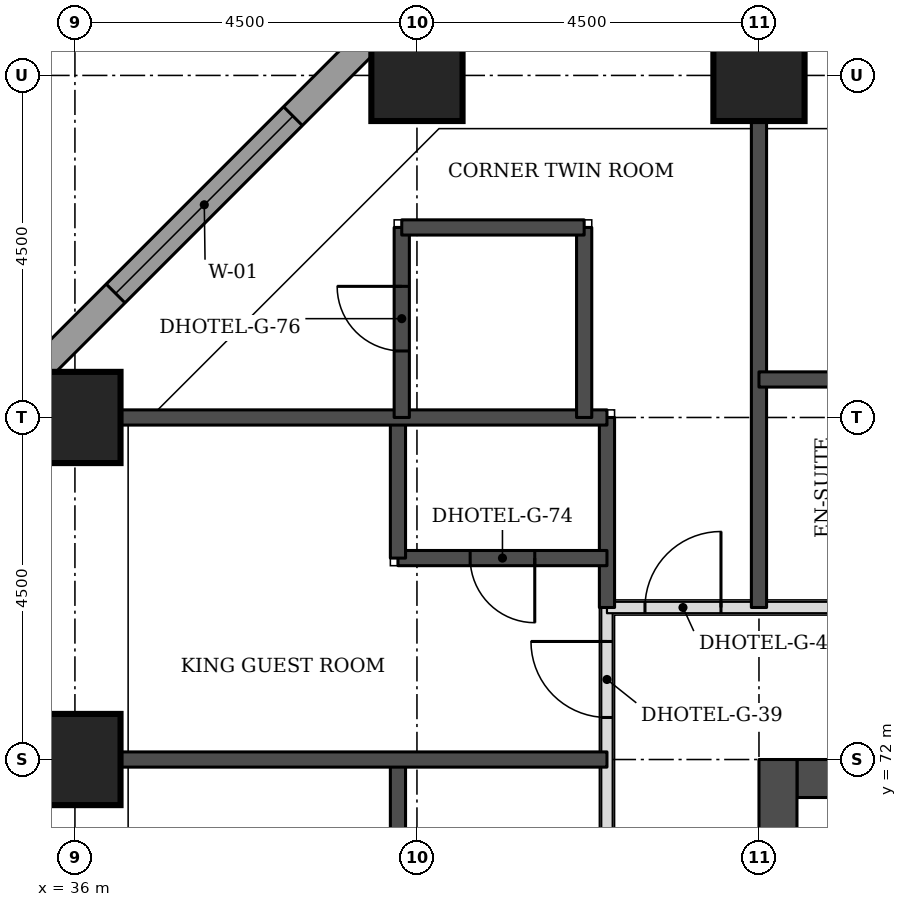
"""IFC4 building model, lengths in metres.
Left out: names, types, materials, properties, quantities, classifications, styles, units other than length and angle.
Written with IfcOpenShell. Run it as: python <this file> out.ifc"""

import sys

from ifc_helpers import new_model, si_unit, direction, frame, frame_2d, origin, origin_2d, place, context, subcontext, project, spatial, rectangle, extrude, element, fill, save


model = new_model("IFC4")
c1 = context("Model", 3, precision=1e-05, world=origin(), true_north=direction((0.0, 1.0)))
c2 = subcontext(c1, "Body", "Model", "MODEL_VIEW")
j1 = project(units=[si_unit("LENGTHUNIT", "METRE"), si_unit("PLANEANGLEUNIT", "RADIAN")], contexts=[c1])
p1 = place(None, origin())
s1 = spatial("IfcSite", under=j1, at=p1, CompositionType="ELEMENT")
p2 = place(p1, origin())
s2 = spatial("IfcBuilding", under=s1, at=p2, CompositionType="ELEMENT")
p3 = place(p2, frame((0.0, 0.0, 66.0)))
s3 = spatial("IfcBuildingStorey", under=s2, at=p3, CompositionType="ELEMENT", Elevation=66.0)
for number, where, z_axis, x_axis in (
    (1, (36.0, 72.0, 0.0), (0.0, 0.0, 1.0), (1.0, 0.0, 0.0)),
    (2, (36.0, 76.5, 0.0), (0.0, 0.0, 1.0), (1.0, 0.0, 0.0)),
    (3, (40.5, 81.0, 0.0), (0.0, 0.0, 1.0), (1.0, 0.0, 0.0)),
    (4, (45.0, 81.0, 0.0), (0.0, 0.0, 1.0), (1.0, 0.0, 0.0)),
):
    element("IfcColumn", number, at=place(p3, frame(where, z_axis=z_axis, x_axis=x_axis)), inside=s3, PredefinedType="COLUMN", context=c2, shape_type="SweptSolid", body=[
        extrude(rectangle(XDim=1.2, YDim=1.2, at=origin_2d()), origin(), (0.0, 0.0, 1.0), 3.3),
    ])
p4 = place(p3, frame((45.5, 71.75, 0.0), z_axis=(0.0, 0.0, 1.0), x_axis=(1.0, 0.0, 0.0)))
e5 = element("IfcWall", 5, at=p4, inside=s3, PredefinedType="SHEAR", context=c2, shape_type="SweptSolid", body=[
    extrude(rectangle(XDim=21.5, YDim=0.5, at=frame_2d((10.75, 0.0))), origin(), (0.0, 0.0, 1.0), 3.3),
])
p5 = place(p3, frame((45.25, 49.5, 0.0), z_axis=(0.0, 0.0, 1.0), x_axis=(0.0, 1.0, 0.0)))
e6 = element("IfcWall", 6, at=p5, inside=s3, PredefinedType="SHEAR", context=c2, shape_type="SweptSolid", body=[
    extrude(rectangle(XDim=22.5, YDim=0.5, at=frame_2d((11.25, 0.0))), origin(), (0.0, 0.0, 1.0), 3.3),
])
p6 = place(p5, frame((4.2, 0.0, 0.0)))
e7 = element("IfcOpeningElement", 7, at=p6, cuts=e6, PredefinedType="OPENING", context=c2, shape_type="SweptSolid", body=[
    extrude(rectangle(XDim=1.8, YDim=2.1, at=frame_2d((0.9, 1.05))), frame((0.0, 0.26, 0.0), z_axis=(0.0, -1.0, 0.0), x_axis=(1.0, 0.0, 0.0)), (0.0, 0.0, 1.0), 0.52),
])
p7 = place(p5, frame((6.9, 0.0, 0.0)))
e8 = element("IfcOpeningElement", 8, at=p7, cuts=e6, PredefinedType="OPENING", context=c2, shape_type="SweptSolid", body=[
    extrude(rectangle(XDim=1.1, YDim=2.1, at=frame_2d((0.55, 1.05))), frame((0.0, 0.26, 0.0), z_axis=(0.0, -1.0, 0.0), x_axis=(1.0, 0.0, 0.0)), (0.0, 0.0, 1.0), 0.52),
])
p8 = place(p5, frame((13.6, 0.0, 0.0)))
e9 = element("IfcOpeningElement", 9, at=p8, cuts=e6, PredefinedType="OPENING", context=c2, shape_type="SweptSolid", body=[
    extrude(rectangle(XDim=1.1, YDim=2.1, at=frame_2d((0.55, 1.05))), frame((0.0, 0.26, 0.0), z_axis=(0.0, -1.0, 0.0), x_axis=(1.0, 0.0, 0.0)), (0.0, 0.0, 1.0), 0.52),
])
p9 = place(p5, frame((16.5, 0.0, 0.0)))
e10 = element("IfcOpeningElement", 10, at=p9, cuts=e6, PredefinedType="OPENING", context=c2, shape_type="SweptSolid", body=[
    extrude(rectangle(XDim=1.8, YDim=2.1, at=frame_2d((0.9, 1.05))), frame((0.0, 0.26, 0.0), z_axis=(0.0, -1.0, 0.0), x_axis=(1.0, 0.0, 0.0)), (0.0, 0.0, 1.0), 0.52),
])
p10 = place(p3, frame((40.23, 81.826, 0.0), z_axis=(0.0, 0.0, 1.0), x_axis=(-0.707106781187, -0.707106781187, 0.0)))
e11 = element("IfcWall", 11, at=p10, inside=s3, PredefinedType="STANDARD", context=c2, shape_type="SweptSolid", body=[
    extrude(rectangle(XDim=7.151, YDim=0.35, at=frame_2d((3.576, 0.0))), origin(), (0.0, 0.0, 1.0), 3.055),
])
p11 = place(p10, frame((1.926, 0.0, 0.8)))
e12 = element("IfcOpeningElement", 12, at=p11, cuts=e11, PredefinedType="OPENING", context=c2, shape_type="SweptSolid", body=[
    extrude(rectangle(XDim=3.3, YDim=1.5, at=frame_2d((1.65, 0.75))), frame((0.0, 0.185, 0.0), z_axis=(0.0, -1.0, 0.0), x_axis=(1.0, 0.0, 0.0)), (0.0, 0.0, 1.0), 0.37),
])
p12 = place(p3, frame((43.0, 56.6, 0.0), z_axis=(0.0, 0.0, 1.0), x_axis=(0.0, 1.0, 0.0)))
e13 = element("IfcWall", 13, at=p12, inside=s3, PredefinedType="PARTITIONING", context=c2, shape_type="SweptSolid", body=[
    extrude(rectangle(XDim=17.4, YDim=0.15, at=frame_2d((8.7, 0.0))), origin(), (0.0, 0.0, 1.0), 3.08),
])
p13 = place(p12, frame((9.075, 0.0, 0.0)))
e14 = element("IfcOpeningElement", 14, at=p13, cuts=e13, PredefinedType="OPENING", context=c2, shape_type="SweptSolid", body=[
    extrude(rectangle(XDim=1.0, YDim=2.1, at=frame_2d((0.5, 1.05))), frame((0.0, 0.085, 0.0), z_axis=(0.0, -1.0, 0.0), x_axis=(1.0, 0.0, 0.0)), (0.0, 0.0, 1.0), 0.17),
])
p14 = place(p12, frame((11.475, 0.0, 0.0)))
e15 = element("IfcOpeningElement", 15, at=p14, cuts=e13, PredefinedType="OPENING", context=c2, shape_type="SweptSolid", body=[
    extrude(rectangle(XDim=1.0, YDim=2.1, at=frame_2d((0.5, 1.05))), frame((0.0, 0.085, 0.0), z_axis=(0.0, -1.0, 0.0), x_axis=(1.0, 0.0, 0.0)), (0.0, 0.0, 1.0), 0.17),
])
p15 = place(p12, frame((15.953, 0.0, 0.0)))
e16 = element("IfcOpeningElement", 16, at=p15, cuts=e13, PredefinedType="OPENING", context=c2, shape_type="SweptSolid", body=[
    extrude(rectangle(XDim=1.0, YDim=2.1, at=frame_2d((0.5, 1.05))), frame((0.0, 0.085, 0.0), z_axis=(0.0, -1.0, 0.0), x_axis=(1.0, 0.0, 0.0)), (0.0, 0.0, 1.0), 0.17),
])
p16 = place(p3, frame((43.0, 74.0, 0.0), z_axis=(0.0, 0.0, 1.0), x_axis=(1.0, 0.0, 0.0)))
e17 = element("IfcWall", 17, at=p16, inside=s3, PredefinedType="PARTITIONING", context=c2, shape_type="SweptSolid", body=[
    extrude(rectangle(XDim=26.5, YDim=0.15, at=frame_2d((13.25, 0.0))), origin(), (0.0, 0.0, 1.0), 3.08),
])
p17 = place(p16, frame((4.925, 0.0, 0.0)))
e18 = element("IfcOpeningElement", 18, at=p17, cuts=e17, PredefinedType="OPENING", context=c2, shape_type="SweptSolid", body=[
    extrude(rectangle(XDim=1.0, YDim=2.1, at=frame_2d((0.5, 1.05))), frame((0.0, 0.085, 0.0), z_axis=(0.0, -1.0, 0.0), x_axis=(1.0, 0.0, 0.0)), (0.0, 0.0, 1.0), 0.17),
])
p18 = place(p16, frame((7.325, 0.0, 0.0)))
e19 = element("IfcOpeningElement", 19, at=p18, cuts=e17, PredefinedType="OPENING", context=c2, shape_type="SweptSolid", body=[
    extrude(rectangle(XDim=1.0, YDim=2.1, at=frame_2d((0.5, 1.05))), frame((0.0, 0.085, 0.0), z_axis=(0.0, -1.0, 0.0), x_axis=(1.0, 0.0, 0.0)), (0.0, 0.0, 1.0), 0.17),
])
p19 = place(p16, frame((13.925, 0.0, 0.0)))
e20 = element("IfcOpeningElement", 20, at=p19, cuts=e17, PredefinedType="OPENING", context=c2, shape_type="SweptSolid", body=[
    extrude(rectangle(XDim=1.0, YDim=2.1, at=frame_2d((0.5, 1.05))), frame((0.0, 0.085, 0.0), z_axis=(0.0, -1.0, 0.0), x_axis=(1.0, 0.0, 0.0)), (0.0, 0.0, 1.0), 0.17),
])
p20 = place(p16, frame((16.325, 0.0, 0.0)))
e21 = element("IfcOpeningElement", 21, at=p20, cuts=e17, PredefinedType="OPENING", context=c2, shape_type="SweptSolid", body=[
    extrude(rectangle(XDim=1.0, YDim=2.1, at=frame_2d((0.5, 1.05))), frame((0.0, 0.085, 0.0), z_axis=(0.0, -1.0, 0.0), x_axis=(1.0, 0.0, 0.0)), (0.0, 0.0, 1.0), 0.17),
])
p21 = place(p16, frame((22.925, 0.0, 0.0)))
e22 = element("IfcOpeningElement", 22, at=p21, cuts=e17, PredefinedType="OPENING", context=c2, shape_type="SweptSolid", body=[
    extrude(rectangle(XDim=1.0, YDim=2.1, at=frame_2d((0.5, 1.05))), frame((0.0, 0.085, 0.0), z_axis=(0.0, -1.0, 0.0), x_axis=(1.0, 0.0, 0.0)), (0.0, 0.0, 1.0), 0.17),
])
p22 = place(p16, frame((0.5, 0.0, 0.0)))
e23 = element("IfcOpeningElement", 23, at=p22, cuts=e17, PredefinedType="OPENING", context=c2, shape_type="SweptSolid", body=[
    extrude(rectangle(XDim=1.0, YDim=2.1, at=frame_2d((0.5, 1.05))), frame((0.0, 0.085, 0.0), z_axis=(0.0, -1.0, 0.0), x_axis=(1.0, 0.0, 0.0)), (0.0, 0.0, 1.0), 0.17),
])
p23 = place(p16, frame((25.0, 0.0, 0.0)))
e24 = element("IfcOpeningElement", 24, at=p23, cuts=e17, PredefinedType="OPENING", context=c2, shape_type="SweptSolid", body=[
    extrude(rectangle(XDim=1.0, YDim=2.1, at=frame_2d((0.5, 1.05))), frame((0.0, 0.085, 0.0), z_axis=(0.0, -1.0, 0.0), x_axis=(1.0, 0.0, 0.0)), (0.0, 0.0, 1.0), 0.17),
])
p24 = place(p3, frame((40.25, 69.65, 0.0), z_axis=(0.0, 0.0, 1.0), x_axis=(0.0, 1.0, 0.0)))
e25 = element("IfcWall", 25, at=p24, inside=s3, PredefinedType="SOLIDWALL", context=c2, shape_type="SweptSolid", body=[
    extrude(rectangle(XDim=2.35, YDim=0.2, at=frame_2d((1.175, 0.0))), origin(), (0.0, 0.0, 1.0), 3.08),
])
p25 = place(p3, frame((36.6, 72.0, 0.0), z_axis=(0.0, 0.0, 1.0), x_axis=(1.0, 0.0, 0.0)))
e26 = element("IfcWall", 26, at=p25, inside=s3, PredefinedType="SOLIDWALL", context=c2, shape_type="SweptSolid", body=[
    extrude(rectangle(XDim=6.4, YDim=0.2, at=frame_2d((3.2, 0.0))), origin(), (0.0, 0.0, 1.0), 3.08),
])
p26 = place(p3, frame((43.0, 74.0, 0.0), z_axis=(0.0, 0.0, 1.0), x_axis=(0.0, 1.0, 0.0)))
e27 = element("IfcWall", 27, at=p26, inside=s3, PredefinedType="SOLIDWALL", context=c2, shape_type="SweptSolid", body=[
    extrude(rectangle(XDim=2.5, YDim=0.2, at=frame_2d((1.25, 0.0))), origin(), (0.0, 0.0, 1.0), 3.08),
])
p27 = place(p3, frame((45.0, 74.0, 0.0), z_axis=(0.0, 0.0, 1.0), x_axis=(0.0, 1.0, 0.0)))
e28 = element("IfcWall", 28, at=p27, inside=s3, PredefinedType="SOLIDWALL", context=c2, shape_type="SweptSolid", body=[
    extrude(rectangle(XDim=6.4, YDim=0.2, at=frame_2d((3.2, 0.0))), origin(), (0.0, 0.0, 1.0), 3.08),
])
p28 = place(p3, frame((40.25, 74.65, 0.0), z_axis=(0.0, 0.0, 1.0), x_axis=(1.0, 0.0, 0.0)))
e29 = element("IfcWall", 29, at=p28, inside=s3, PredefinedType="SOLIDWALL", context=c2, shape_type="SweptSolid", body=[
    extrude(rectangle(XDim=2.75, YDim=0.2, at=frame_2d((1.375, 0.0))), origin(), (0.0, 0.0, 1.0), 3.08),
])
p29 = place(p28, frame((0.95, 0.0, 0.0)))
e30 = element("IfcOpeningElement", 30, at=p29, cuts=e29, PredefinedType="OPENING", context=c2, shape_type="SweptSolid", body=[
    extrude(rectangle(XDim=0.85, YDim=2.1, at=frame_2d((0.425, 1.05))), frame((0.0, 0.11, 0.0), z_axis=(0.0, -1.0, 0.0), x_axis=(1.0, 0.0, 0.0)), (0.0, 0.0, 1.0), 0.22),
])
p30 = place(p3, frame((40.25, 74.65, 0.0), z_axis=(0.0, 0.0, 1.0), x_axis=(0.0, 1.0, 0.0)))
e31 = element("IfcWall", 31, at=p30, inside=s3, PredefinedType="SOLIDWALL", context=c2, shape_type="SweptSolid", body=[
    extrude(rectangle(XDim=1.85, YDim=0.2, at=frame_2d((0.925, 0.0))), origin(), (0.0, 0.0, 1.0), 3.08),
])
p31 = place(p3, frame((36.6, 76.5, 0.0), z_axis=(0.0, 0.0, 1.0), x_axis=(1.0, 0.0, 0.0)))
e32 = element("IfcWall", 32, at=p31, inside=s3, PredefinedType="SOLIDWALL", context=c2, shape_type="SweptSolid", body=[
    extrude(rectangle(XDim=6.4, YDim=0.2, at=frame_2d((3.2, 0.0))), origin(), (0.0, 0.0, 1.0), 3.08),
])
p32 = place(p3, frame((40.3, 76.5, 0.0), z_axis=(0.0, 0.0, 1.0), x_axis=(0.0, 1.0, 0.0)))
e33 = element("IfcWall", 33, at=p32, inside=s3, PredefinedType="SOLIDWALL", context=c2, shape_type="SweptSolid", body=[
    extrude(rectangle(XDim=2.5, YDim=0.2, at=frame_2d((1.25, 0.0))), origin(), (0.0, 0.0, 1.0), 3.08),
])
p33 = place(p32, frame((0.875, 0.0, 0.0)))
e34 = element("IfcOpeningElement", 34, at=p33, cuts=e33, PredefinedType="OPENING", context=c2, shape_type="SweptSolid", body=[
    extrude(rectangle(XDim=0.85, YDim=2.1, at=frame_2d((0.425, 1.05))), frame((0.0, 0.11, 0.0), z_axis=(0.0, -1.0, 0.0), x_axis=(1.0, 0.0, 0.0)), (0.0, 0.0, 1.0), 0.22),
])
p34 = place(p3, frame((42.7, 76.5, 0.0), z_axis=(0.0, 0.0, 1.0), x_axis=(0.0, 1.0, 0.0)))
e35 = element("IfcWall", 35, at=p34, inside=s3, PredefinedType="SOLIDWALL", context=c2, shape_type="SweptSolid", body=[
    extrude(rectangle(XDim=2.5, YDim=0.2, at=frame_2d((1.25, 0.0))), origin(), (0.0, 0.0, 1.0), 3.08),
])
p35 = place(p3, frame((45.0, 77.0, 0.0), z_axis=(0.0, 0.0, 1.0), x_axis=(1.0, 0.0, 0.0)))
e36 = element("IfcWall", 36, at=p35, inside=s3, PredefinedType="SOLIDWALL", context=c2, shape_type="SweptSolid", body=[
    extrude(rectangle(XDim=2.35, YDim=0.2, at=frame_2d((1.175, 0.0))), origin(), (0.0, 0.0, 1.0), 3.08),
])
p36 = place(p3, frame((40.3, 79.0, 0.0), z_axis=(0.0, 0.0, 1.0), x_axis=(1.0, 0.0, 0.0)))
e37 = element("IfcWall", 37, at=p36, inside=s3, PredefinedType="SOLIDWALL", context=c2, shape_type="SweptSolid", body=[
    extrude(rectangle(XDim=2.4, YDim=0.2, at=frame_2d((1.2, 0.0))), origin(), (0.0, 0.0, 1.0), 3.08),
])
p37 = place(p11, origin())
e38 = element("IfcWindow", 38, at=p37, inside=s3, PartitioningType="SINGLE_PANEL", PredefinedType="WINDOW", context=c2, shape_type="SweptSolid", body=[
    extrude(rectangle(XDim=3.3, YDim=1.5, at=frame_2d((1.65, 0.75))), frame((0.0, 0.085, 0.0), z_axis=(0.0, -1.0, 0.0), x_axis=(1.0, 0.0, 0.0)), (0.0, 0.0, 1.0), 0.06),
])
fill(e12, e38)
p38 = place(p15, origin())
e39 = element("IfcDoor", 39, at=p38, inside=s3, OperationType="SINGLE_SWING_RIGHT", PredefinedType="DOOR", context=c2, shape_type="SweptSolid", body=[
    extrude(rectangle(XDim=1.0, YDim=2.1, at=frame_2d((0.5, 1.05))), frame((0.0, 0.025, 0.0), z_axis=(0.0, -1.0, 0.0), x_axis=(1.0, 0.0, 0.0)), (0.0, 0.0, 1.0), 0.05),
])
fill(e16, e39)
p39 = place(p29, frame((0.85, 0.0, 0.0), z_axis=(0.0, 0.0, 1.0), x_axis=(-1.0, 0.0, 0.0)))
e40 = element("IfcDoor", 40, at=p39, inside=s3, OperationType="SINGLE_SWING_LEFT", PredefinedType="DOOR", context=c2, shape_type="SweptSolid", body=[
    extrude(rectangle(XDim=0.85, YDim=2.1, at=frame_2d((0.425, 1.05))), frame((0.0, 0.025, 0.0), z_axis=(0.0, -1.0, 0.0), x_axis=(1.0, 0.0, 0.0)), (0.0, 0.0, 1.0), 0.05),
])
fill(e30, e40)
p40 = place(p22, origin())
e41 = element("IfcDoor", 41, at=p40, inside=s3, OperationType="SINGLE_SWING_RIGHT", PredefinedType="DOOR", context=c2, shape_type="SweptSolid", body=[
    extrude(rectangle(XDim=1.0, YDim=2.1, at=frame_2d((0.5, 1.05))), frame((0.0, 0.025, 0.0), z_axis=(0.0, -1.0, 0.0), x_axis=(1.0, 0.0, 0.0)), (0.0, 0.0, 1.0), 0.05),
])
fill(e23, e41)
p41 = place(p33, origin())
e42 = element("IfcDoor", 42, at=p41, inside=s3, OperationType="SINGLE_SWING_RIGHT", PredefinedType="DOOR", context=c2, shape_type="SweptSolid", body=[
    extrude(rectangle(XDim=0.85, YDim=2.1, at=frame_2d((0.425, 1.05))), frame((0.0, 0.025, 0.0), z_axis=(0.0, -1.0, 0.0), x_axis=(1.0, 0.0, 0.0)), (0.0, 0.0, 1.0), 0.05),
])
fill(e34, e42)
save(model, sys.argv[1])
